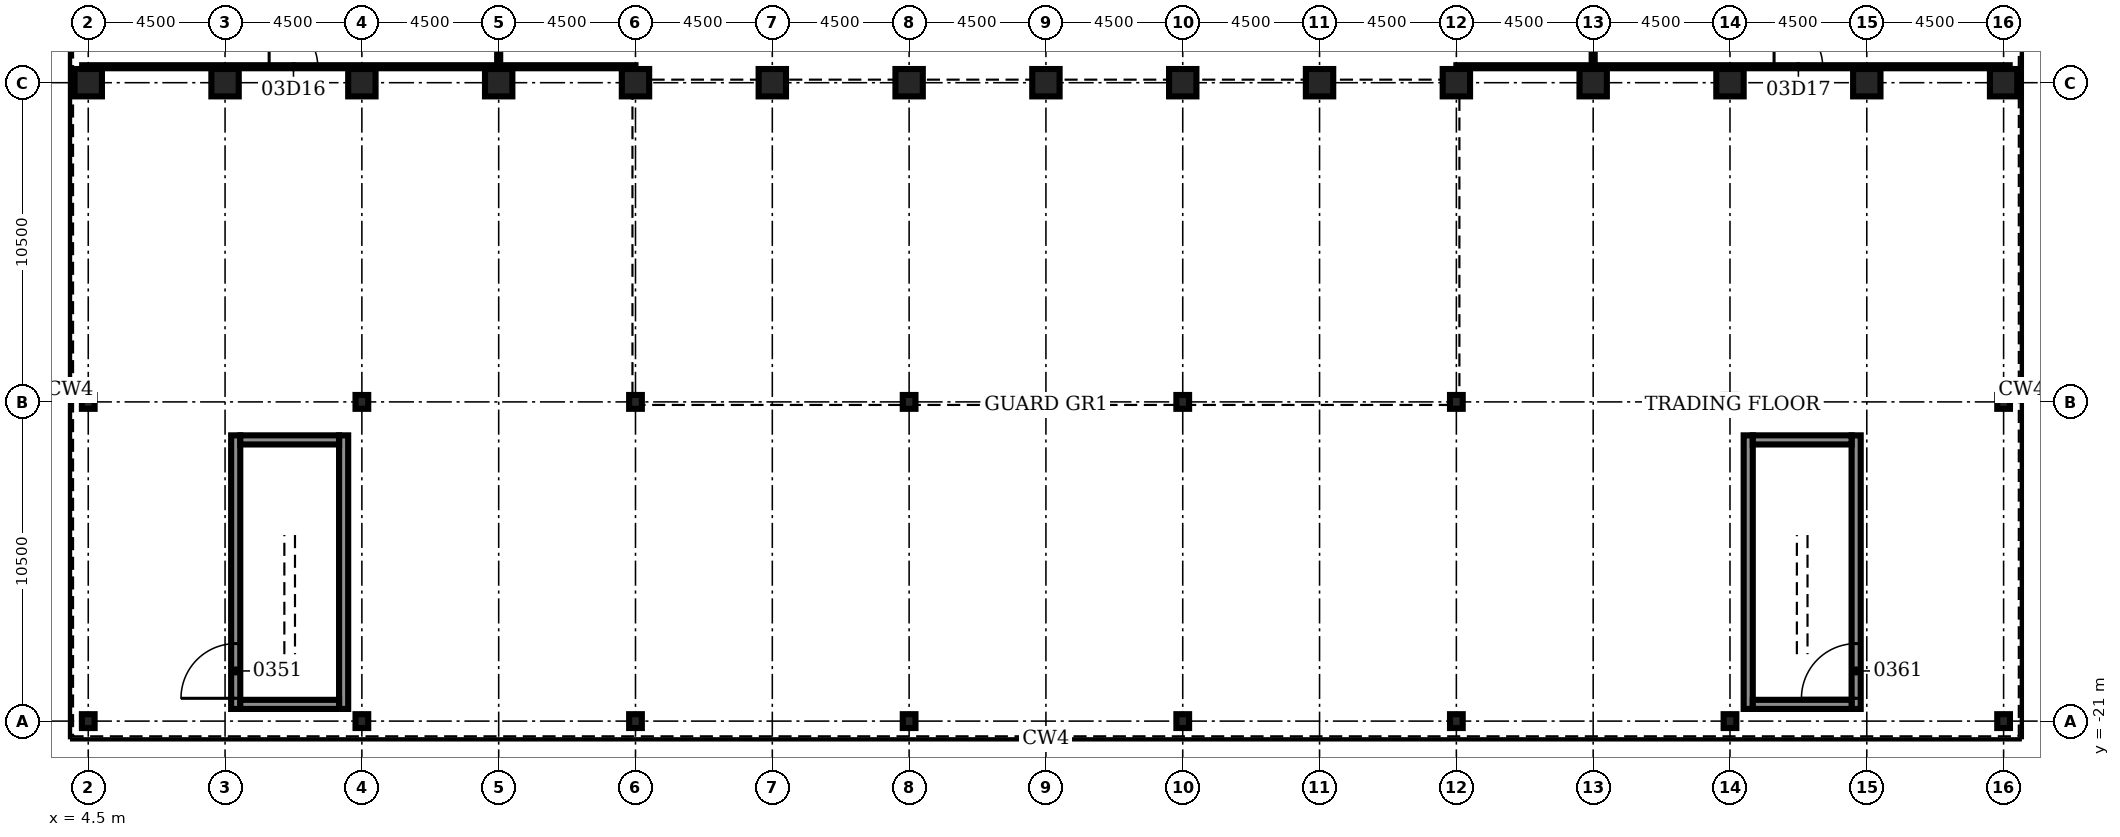
"""IFC4 building model, lengths in metres.
Left out: names, types, materials, properties, quantities, classifications, styles, units other than length and angle.
Written with IfcOpenShell. Run it as: python <this file> out.ifc"""

import sys

from ifc_helpers import new_model, si_unit, direction, frame, frame_2d, origin, origin_2d, place, context, subcontext, project, spatial, rectangle, hollow_rectangle, i_section, extrude, element, fill, save


model = new_model("IFC4")
c1 = context("Model", 3, precision=1e-05, world=origin(), true_north=direction((0.0, 1.0)))
c2 = subcontext(c1, "Body", "Model", "MODEL_VIEW")
j1 = project(units=[si_unit("LENGTHUNIT", "METRE"), si_unit("PLANEANGLEUNIT", "RADIAN")], contexts=[c1])
p1 = place(None, origin())
s1 = spatial("IfcSite", under=j1, at=p1, CompositionType="ELEMENT")
p2 = place(p1, origin())
s2 = spatial("IfcBuilding", under=s1, at=p2, CompositionType="ELEMENT")
p3 = place(p2, frame((0.0, 0.0, 18.0)))
s3 = spatial("IfcBuildingStorey", under=s2, at=p3, CompositionType="ELEMENT", Elevation=18.0)
for number, where, z_axis, x_axis in (
    (1, (4.5, 0.0, 0.0), (0.0, 0.0, 1.0), (0.0, 1.0, 0.0)),
    (2, (9.0, 0.0, 0.0), (0.0, 0.0, 1.0), (0.0, 1.0, 0.0)),
    (3, (13.5, 0.0, 0.0), (0.0, 0.0, 1.0), (0.0, 1.0, 0.0)),
    (4, (18.0, 0.0, 0.0), (0.0, 0.0, 1.0), (0.0, 1.0, 0.0)),
    (5, (22.5, 0.0, 0.0), (0.0, 0.0, 1.0), (0.0, 1.0, 0.0)),
    (6, (27.0, 0.0, 0.0), (0.0, 0.0, 1.0), (0.0, 1.0, 0.0)),
    (7, (31.5, 0.0, 0.0), (0.0, 0.0, 1.0), (0.0, 1.0, 0.0)),
    (8, (36.0, 0.0, 0.0), (0.0, 0.0, 1.0), (0.0, 1.0, 0.0)),
    (9, (40.5, 0.0, 0.0), (0.0, 0.0, 1.0), (0.0, 1.0, 0.0)),
    (10, (45.0, 0.0, 0.0), (0.0, 0.0, 1.0), (0.0, 1.0, 0.0)),
    (11, (49.5, 0.0, 0.0), (0.0, 0.0, 1.0), (0.0, 1.0, 0.0)),
    (12, (54.0, 0.0, 0.0), (0.0, 0.0, 1.0), (0.0, 1.0, 0.0)),
    (13, (58.5, 0.0, 0.0), (0.0, 0.0, 1.0), (0.0, 1.0, 0.0)),
    (14, (63.0, 0.0, 0.0), (0.0, 0.0, 1.0), (0.0, 1.0, 0.0)),
    (15, (67.5, 0.0, 0.0), (0.0, 0.0, 1.0), (0.0, 1.0, 0.0)),
):
    element("IfcColumn", number, at=place(p3, frame(where, z_axis=z_axis, x_axis=x_axis)), inside=s3, PredefinedType="COLUMN", context=c2, shape_type="SweptSolid", body=[
        extrude(hollow_rectangle(XDim=0.9, YDim=0.9, WallThickness=0.12, at=origin_2d()), origin(), (0.0, 0.0, 1.0), 5.0),
    ])
for number, where, z_axis, x_axis in (
    (16, (4.5, -21.0, 0.0), (0.0, 0.0, 1.0), (1.0, 0.0, 0.0)),
    (17, (4.5, -10.5, 0.0), (0.0, 0.0, 1.0), (1.0, 0.0, 0.0)),
    (18, (13.5, -21.0, 0.0), (0.0, 0.0, 1.0), (1.0, 0.0, 0.0)),
    (19, (13.5, -10.5, 0.0), (0.0, 0.0, 1.0), (1.0, 0.0, 0.0)),
    (20, (22.5, -21.0, 0.0), (0.0, 0.0, 1.0), (1.0, 0.0, 0.0)),
    (21, (22.5, -10.5, 0.0), (0.0, 0.0, 1.0), (1.0, 0.0, 0.0)),
    (22, (31.5, -21.0, 0.0), (0.0, 0.0, 1.0), (1.0, 0.0, 0.0)),
    (23, (31.5, -10.5, 0.0), (0.0, 0.0, 1.0), (1.0, 0.0, 0.0)),
    (24, (40.5, -21.0, 0.0), (0.0, 0.0, 1.0), (1.0, 0.0, 0.0)),
    (25, (40.5, -10.5, 0.0), (0.0, 0.0, 1.0), (1.0, 0.0, 0.0)),
    (26, (49.5, -21.0, 0.0), (0.0, 0.0, 1.0), (1.0, 0.0, 0.0)),
    (27, (49.5, -10.5, 0.0), (0.0, 0.0, 1.0), (1.0, 0.0, 0.0)),
    (28, (58.5, -21.0, 0.0), (0.0, 0.0, 1.0), (1.0, 0.0, 0.0)),
    (29, (58.5, -10.5, 0.0), (0.0, 0.0, 1.0), (1.0, 0.0, 0.0)),
    (30, (67.5, -21.0, 0.0), (0.0, 0.0, 1.0), (1.0, 0.0, 0.0)),
    (31, (67.5, -10.5, 0.0), (0.0, 0.0, 1.0), (1.0, 0.0, 0.0)),
):
    element("IfcColumn", number, at=place(p3, frame(where, z_axis=z_axis, x_axis=x_axis)), inside=s3, PredefinedType="COLUMN", context=c2, shape_type="SweptSolid", body=[
        extrude(i_section(OverallWidth=0.418, OverallDepth=0.455, WebThickness=0.042, FlangeThickness=0.068, at=origin_2d()), origin(), (0.0, 0.0, 1.0), 5.0),
    ])
p4 = place(p3, frame((18.0, 0.575, 0.0), z_axis=(0.0, 0.0, 1.0), x_axis=(0.0, 1.0, 0.0)))
e32 = element("IfcWall", 32, at=p4, inside=s3, PredefinedType="PARTITIONING", context=c2, shape_type="SweptSolid", body=[
    extrude(rectangle(XDim=14.975, YDim=0.1, at=frame_2d((7.488, 0.0))), origin(), (0.0, 0.0, 1.0), 3.0),
])
p5 = place(p4, frame((2.944, 0.0, 0.0)))
e33 = element("IfcOpeningElement", 33, at=p5, cuts=e32, PredefinedType="OPENING", context=c2, shape_type="SweptSolid", body=[
    extrude(rectangle(XDim=1.6, YDim=2.1, at=frame_2d((0.8, 1.05))), frame((0.0, 0.06, 0.0), z_axis=(0.0, -1.0, 0.0), x_axis=(1.0, 0.0, 0.0)), (0.0, 0.0, 1.0), 0.12),
])
p6 = place(p4, frame((10.431, 0.0, 0.0)))
e34 = element("IfcOpeningElement", 34, at=p6, cuts=e32, PredefinedType="OPENING", context=c2, shape_type="SweptSolid", body=[
    extrude(rectangle(XDim=1.6, YDim=2.1, at=frame_2d((0.8, 1.05))), frame((0.0, 0.06, 0.0), z_axis=(0.0, -1.0, 0.0), x_axis=(1.0, 0.0, 0.0)), (0.0, 0.0, 1.0), 0.12),
])
p7 = place(p3, frame((54.0, 0.575, 0.0), z_axis=(0.0, 0.0, 1.0), x_axis=(0.0, 1.0, 0.0)))
e35 = element("IfcWall", 35, at=p7, inside=s3, PredefinedType="PARTITIONING", context=c2, shape_type="SweptSolid", body=[
    extrude(rectangle(XDim=14.975, YDim=0.1, at=frame_2d((7.488, 0.0))), origin(), (0.0, 0.0, 1.0), 3.0),
])
p8 = place(p7, frame((2.944, 0.0, 0.0)))
e36 = element("IfcOpeningElement", 36, at=p8, cuts=e35, PredefinedType="OPENING", context=c2, shape_type="SweptSolid", body=[
    extrude(rectangle(XDim=1.6, YDim=2.1, at=frame_2d((0.8, 1.05))), frame((0.0, 0.06, 0.0), z_axis=(0.0, -1.0, 0.0), x_axis=(1.0, 0.0, 0.0)), (0.0, 0.0, 1.0), 0.12),
])
p9 = place(p7, frame((10.431, 0.0, 0.0)))
e37 = element("IfcOpeningElement", 37, at=p9, cuts=e35, PredefinedType="OPENING", context=c2, shape_type="SweptSolid", body=[
    extrude(rectangle(XDim=1.6, YDim=2.1, at=frame_2d((0.8, 1.05))), frame((0.0, 0.06, 0.0), z_axis=(0.0, -1.0, 0.0), x_axis=(1.0, 0.0, 0.0)), (0.0, 0.0, 1.0), 0.12),
])
p10 = place(p3, frame((4.3, 0.525, 0.0), z_axis=(0.0, 0.0, 1.0), x_axis=(1.0, 0.0, 0.0)))
e38 = element("IfcWall", 38, at=p10, inside=s3, PredefinedType="PARTITIONING", context=c2, shape_type="SweptSolid", body=[
    extrude(rectangle(XDim=18.2, YDim=0.1, at=frame_2d((9.1, 0.0))), origin(), (0.0, 0.0, 1.0), 3.0),
])
p11 = place(p10, frame((6.15, 0.0, 0.0)))
e39 = element("IfcOpeningElement", 39, at=p11, cuts=e38, PredefinedType="OPENING", context=c2, shape_type="SweptSolid", body=[
    extrude(rectangle(XDim=1.6, YDim=2.1, at=frame_2d((0.8, 1.05))), frame((0.0, 0.06, 0.0), z_axis=(0.0, -1.0, 0.0), x_axis=(1.0, 0.0, 0.0)), (0.0, 0.0, 1.0), 0.12),
])
p12 = place(p3, frame((49.5, 0.525, 0.0), z_axis=(0.0, 0.0, 1.0), x_axis=(1.0, 0.0, 0.0)))
e40 = element("IfcWall", 40, at=p12, inside=s3, PredefinedType="PARTITIONING", context=c2, shape_type="SweptSolid", body=[
    extrude(rectangle(XDim=18.2, YDim=0.1, at=frame_2d((9.1, 0.0))), origin(), (0.0, 0.0, 1.0), 3.0),
])
p13 = place(p12, frame((10.45, 0.0, 0.0)))
e41 = element("IfcOpeningElement", 41, at=p13, cuts=e40, PredefinedType="OPENING", context=c2, shape_type="SweptSolid", body=[
    extrude(rectangle(XDim=1.6, YDim=2.1, at=frame_2d((0.8, 1.05))), frame((0.0, 0.06, 0.0), z_axis=(0.0, -1.0, 0.0), x_axis=(1.0, 0.0, 0.0)), (0.0, 0.0, 1.0), 0.12),
])
p14 = place(p3, frame((9.35, -20.6, 0.0), z_axis=(0.0, 0.0, 1.0), x_axis=(0.0, 1.0, 0.0)))
e42 = element("IfcWall", 42, at=p14, inside=s3, PredefinedType="SOLIDWALL", context=c2, shape_type="SweptSolid", body=[
    extrude(rectangle(XDim=9.0, YDim=0.3, at=frame_2d((4.5, 0.0))), origin(), (0.0, 0.0, 1.0), 5.0),
])
p15 = place(p14, frame((0.35, 0.0, 0.0)))
e43 = element("IfcOpeningElement", 43, at=p15, cuts=e42, PredefinedType="OPENING", context=c2, shape_type="SweptSolid", body=[
    extrude(rectangle(XDim=1.8, YDim=2.1, at=frame_2d((0.9, 1.05))), frame((0.0, 0.16, 0.0), z_axis=(0.0, -1.0, 0.0), x_axis=(1.0, 0.0, 0.0)), (0.0, 0.0, 1.0), 0.32),
])
p16 = place(p3, frame((12.9, -20.6, 0.0), z_axis=(0.0, 0.0, 1.0), x_axis=(0.0, 1.0, 0.0)))
e44 = element("IfcWall", 44, at=p16, inside=s3, PredefinedType="SOLIDWALL", context=c2, shape_type="SweptSolid", body=[
    extrude(rectangle(XDim=9.0, YDim=0.3, at=frame_2d((4.5, 0.0))), origin(), (0.0, 0.0, 1.0), 5.0),
])
for number, where, z_axis, x_axis in (
    (45, (9.5, -20.45, 0.0), (0.0, 0.0, 1.0), (1.0, 0.0, 0.0)),
    (46, (9.5, -11.75, 0.0), (0.0, 0.0, 1.0), (1.0, 0.0, 0.0)),
):
    element("IfcWall", number, at=place(p3, frame(where, z_axis=z_axis, x_axis=x_axis)), inside=s3, PredefinedType="SOLIDWALL", context=c2, shape_type="SweptSolid", body=[
        extrude(rectangle(XDim=3.25, YDim=0.3, at=frame_2d((1.625, 0.0))), origin(), (0.0, 0.0, 1.0), 5.0),
    ])
p17 = place(p3, frame((59.1, -20.6, 0.0), z_axis=(0.0, 0.0, 1.0), x_axis=(0.0, 1.0, 0.0)))
e47 = element("IfcWall", 47, at=p17, inside=s3, PredefinedType="SOLIDWALL", context=c2, shape_type="SweptSolid", body=[
    extrude(rectangle(XDim=9.0, YDim=0.3, at=frame_2d((4.5, 0.0))), origin(), (0.0, 0.0, 1.0), 5.0),
])
p18 = place(p3, frame((62.65, -20.6, 0.0), z_axis=(0.0, 0.0, 1.0), x_axis=(0.0, 1.0, 0.0)))
e48 = element("IfcWall", 48, at=p18, inside=s3, PredefinedType="SOLIDWALL", context=c2, shape_type="SweptSolid", body=[
    extrude(rectangle(XDim=9.0, YDim=0.3, at=frame_2d((4.5, 0.0))), origin(), (0.0, 0.0, 1.0), 5.0),
])
p19 = place(p18, frame((0.35, 0.0, 0.0)))
e49 = element("IfcOpeningElement", 49, at=p19, cuts=e48, PredefinedType="OPENING", context=c2, shape_type="SweptSolid", body=[
    extrude(rectangle(XDim=1.8, YDim=2.1, at=frame_2d((0.9, 1.05))), frame((0.0, 0.16, 0.0), z_axis=(0.0, -1.0, 0.0), x_axis=(1.0, 0.0, 0.0)), (0.0, 0.0, 1.0), 0.32),
])
for number, where, z_axis, x_axis in (
    (50, (59.25, -20.45, 0.0), (0.0, 0.0, 1.0), (1.0, 0.0, 0.0)),
    (51, (59.25, -11.75, 0.0), (0.0, 0.0, 1.0), (1.0, 0.0, 0.0)),
):
    element("IfcWall", number, at=place(p3, frame(where, z_axis=z_axis, x_axis=x_axis)), inside=s3, PredefinedType="SOLIDWALL", context=c2, shape_type="SweptSolid", body=[
        extrude(rectangle(XDim=3.25, YDim=0.3, at=frame_2d((1.625, 0.0))), origin(), (0.0, 0.0, 1.0), 5.0),
    ])
p20 = place(p11, origin())
e52 = element("IfcDoor", 52, at=p20, inside=s3, OperationType="SINGLE_SWING_LEFT", PredefinedType="DOOR", context=c2, shape_type="SweptSolid", body=[
    extrude(rectangle(XDim=1.6, YDim=2.1, at=frame_2d((0.8, 1.05))), frame((0.0, 0.025, 0.0), z_axis=(0.0, -1.0, 0.0), x_axis=(1.0, 0.0, 0.0)), (0.0, 0.0, 1.0), 0.05),
])
fill(e39, e52)
p21 = place(p13, origin())
e53 = element("IfcDoor", 53, at=p21, inside=s3, OperationType="SINGLE_SWING_LEFT", PredefinedType="DOOR", context=c2, shape_type="SweptSolid", body=[
    extrude(rectangle(XDim=1.6, YDim=2.1, at=frame_2d((0.8, 1.05))), frame((0.0, 0.025, 0.0), z_axis=(0.0, -1.0, 0.0), x_axis=(1.0, 0.0, 0.0)), (0.0, 0.0, 1.0), 0.05),
])
fill(e41, e53)
p22 = place(p15, origin())
e54 = element("IfcDoor", 54, at=p22, inside=s3, OperationType="SINGLE_SWING_LEFT", PredefinedType="DOOR", context=c2, shape_type="SweptSolid", body=[
    extrude(rectangle(XDim=1.8, YDim=2.1, at=frame_2d((0.9, 1.05))), frame((0.0, 0.025, 0.0), z_axis=(0.0, -1.0, 0.0), x_axis=(1.0, 0.0, 0.0)), (0.0, 0.0, 1.0), 0.05),
])
fill(e43, e54)
p23 = place(p19, origin())
e55 = element("IfcDoor", 55, at=p23, inside=s3, OperationType="SINGLE_SWING_LEFT", PredefinedType="DOOR", context=c2, shape_type="SweptSolid", body=[
    extrude(rectangle(XDim=1.8, YDim=2.1, at=frame_2d((0.9, 1.05))), frame((0.0, 0.025, 0.0), z_axis=(0.0, -1.0, 0.0), x_axis=(1.0, 0.0, 0.0)), (0.0, 0.0, 1.0), 0.05),
])
fill(e49, e55)
save(model, sys.argv[1])
